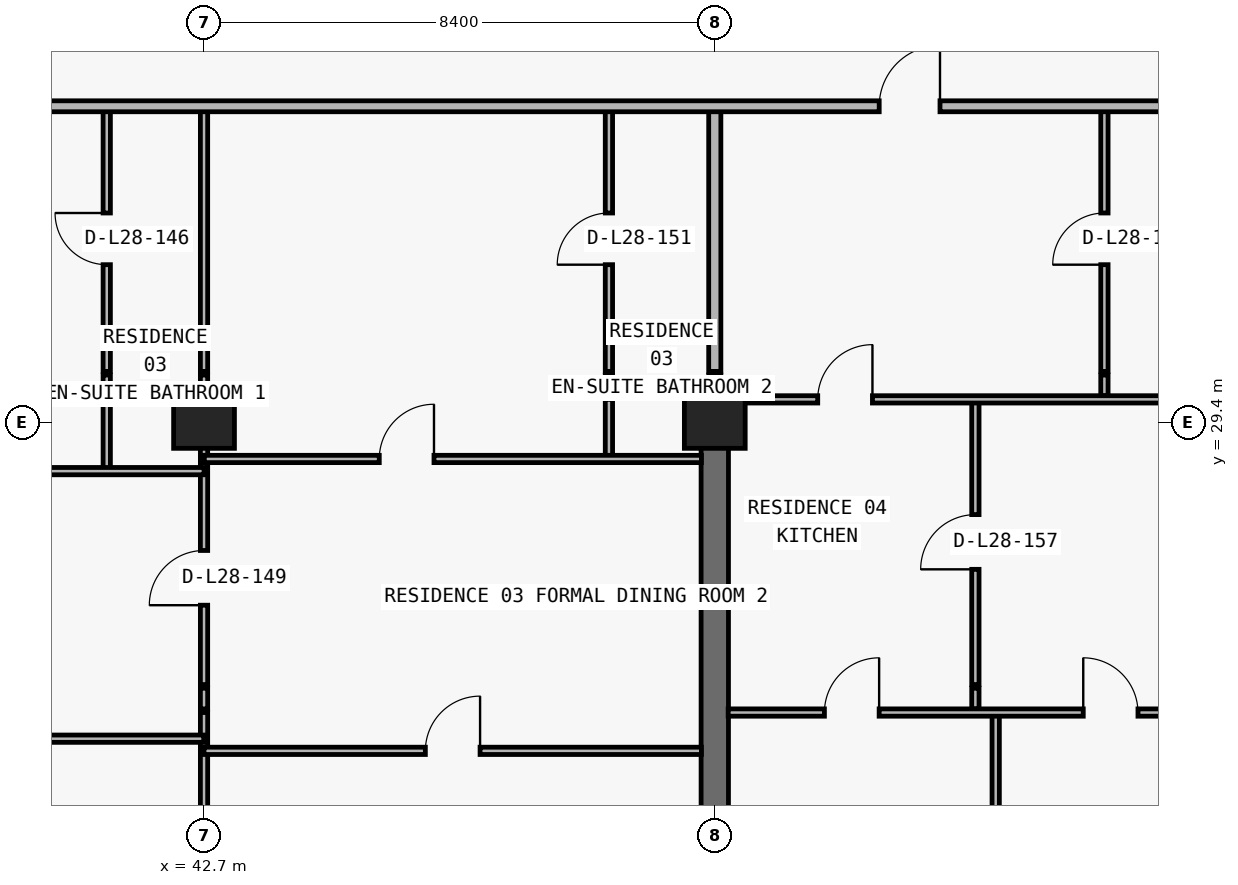
"""IFC4 building model, lengths in metres.
Left out: names, types, materials, properties, quantities, classifications, styles, units other than length and angle.
Written with IfcOpenShell. Run it as: python <this file> out.ifc"""

import sys

from ifc_helpers import new_model, si_unit, direction, frame, frame_2d, origin, origin_2d, place, context, subcontext, project, spatial, rectangle, extrude, element, fill, save


model = new_model("IFC4")
c1 = context("Model", 3, precision=1e-05, world=origin(), true_north=direction((0.0, 1.0)))
c2 = subcontext(c1, "Body", "Model", "MODEL_VIEW")
j1 = project(units=[si_unit("LENGTHUNIT", "METRE"), si_unit("PLANEANGLEUNIT", "RADIAN")], contexts=[c1])
p1 = place(None, origin())
s1 = spatial("IfcSite", under=j1, at=p1, CompositionType="ELEMENT")
p2 = place(p1, origin())
s2 = spatial("IfcBuilding", under=s1, at=p2, CompositionType="ELEMENT")
p3 = place(p2, frame((0.0, 0.0, 105.9)))
s3 = spatial("IfcBuildingStorey", under=s2, at=p3, CompositionType="ELEMENT", Elevation=105.9)
for number, where, z_axis, x_axis in (
    (1, (42.7, 29.4, 0.0), (0.0, 0.0, 1.0), (1.0, 0.0, 0.0)),
    (2, (51.1, 29.4, 0.0), (0.0, 0.0, 1.0), (1.0, 0.0, 0.0)),
):
    element("IfcColumn", number, at=place(p3, frame(where, z_axis=z_axis, x_axis=x_axis)), inside=s3, PredefinedType="COLUMN", context=c2, shape_type="SweptSolid", body=[
        extrude(rectangle(XDim=1.0, YDim=0.85, at=origin_2d()), origin(), (0.0, 0.0, 1.0), 3.05),
    ])
p4 = place(p3, frame((51.1, 20.8, 0.0), z_axis=(0.0, 0.0, 1.0), x_axis=(0.0, 1.0, 0.0)))
e3 = element("IfcWall", 3, at=p4, inside=s3, PredefinedType="SHEAR", context=c2, shape_type="SweptSolid", body=[
    extrude(rectangle(XDim=8.6, YDim=0.45, at=frame_2d((4.3, 0.0))), origin(), (0.0, 0.0, 1.0), 3.05),
])
p5 = place(p3, frame((41.1, 28.6, 0.0), z_axis=(0.0, 0.0, 1.0), x_axis=(0.0, 1.0, 0.0)))
e4 = element("IfcWall", 4, at=p5, inside=s3, PredefinedType="PARTITIONING", context=c2, shape_type="SweptSolid", body=[
    extrude(rectangle(XDim=1.18, YDim=0.12, at=frame_2d((0.59, 0.0))), origin(), (0.0, 0.0, 1.0), 3.05),
])
p6 = place(p3, frame((41.1, 29.84, 0.0), z_axis=(0.0, 0.0, 1.0), x_axis=(0.0, 1.0, 0.0)))
e5 = element("IfcWall", 5, at=p6, inside=s3, PredefinedType="PARTITIONING", context=c2, shape_type="SweptSolid", body=[
    extrude(rectangle(XDim=0.34, YDim=0.12, at=frame_2d((0.17, 0.0))), origin(), (0.0, 0.0, 1.0), 3.05),
])
p7 = place(p3, frame((41.1, 30.24, 0.0), z_axis=(0.0, 0.0, 1.0), x_axis=(0.0, 1.0, 0.0)))
e6 = element("IfcWall", 6, at=p7, inside=s3, PredefinedType="PARTITIONING", context=c2, shape_type="SweptSolid", body=[
    extrude(rectangle(XDim=4.36, YDim=0.12, at=frame_2d((2.18, 0.0))), origin(), (0.0, 0.0, 1.0), 3.05),
])
p8 = place(p7, frame((1.755, 0.0, 0.0)))
e7 = element("IfcOpeningElement", 7, at=p8, cuts=e6, PredefinedType="OPENING", context=c2, shape_type="SweptSolid", body=[
    extrude(rectangle(XDim=0.85, YDim=2.1, at=frame_2d((0.425, 1.05))), frame((0.0, 0.07, 0.0), z_axis=(0.0, -1.0, 0.0), x_axis=(1.0, 0.0, 0.0)), (0.0, 0.0, 1.0), 0.14),
])
p9 = place(p3, frame((42.7, 8.84, 0.0), z_axis=(0.0, 0.0, 1.0), x_axis=(0.0, 1.0, 0.0)))
e8 = element("IfcWall", 8, at=p9, inside=s3, PredefinedType="PARTITIONING", context=c2, shape_type="SweptSolid", body=[
    extrude(rectangle(XDim=15.79, YDim=0.12, at=frame_2d((7.895, 0.0))), origin(), (0.0, 0.0, 1.0), 2.174),
])
p10 = place(p3, frame((42.7, 24.69, 0.0), z_axis=(0.0, 0.0, 1.0), x_axis=(0.0, 1.0, 0.0)))
e9 = element("IfcWall", 9, at=p10, inside=s3, PredefinedType="PARTITIONING", context=c2, shape_type="SweptSolid", body=[
    extrude(rectangle(XDim=0.34, YDim=0.12, at=frame_2d((0.17, 0.0))), origin(), (0.0, 0.0, 1.0), 2.174),
])
p11 = place(p3, frame((42.7, 25.09, 0.0), z_axis=(0.0, 0.0, 1.0), x_axis=(0.0, 1.0, 0.0)))
e10 = element("IfcWall", 10, at=p11, inside=s3, PredefinedType="PARTITIONING", context=c2, shape_type="SweptSolid", body=[
    extrude(rectangle(XDim=4.69, YDim=0.12, at=frame_2d((2.345, 0.0))), origin(), (0.0, 0.0, 1.0), 2.174),
])
p12 = place(p11, frame((1.305, 0.0, 0.0)))
e11 = element("IfcOpeningElement", 11, at=p12, cuts=e10, PredefinedType="OPENING", context=c2, shape_type="SweptSolid", body=[
    extrude(rectangle(XDim=0.9, YDim=2.124, at=frame_2d((0.45, 1.062))), frame((0.0, 0.07, 0.0), z_axis=(0.0, -1.0, 0.0), x_axis=(1.0, 0.0, 0.0)), (0.0, 0.0, 1.0), 0.14),
])
p13 = place(p3, frame((42.7, 29.84, 0.0), z_axis=(0.0, 0.0, 1.0), x_axis=(0.0, 1.0, 0.0)))
e12 = element("IfcWall", 12, at=p13, inside=s3, PredefinedType="PARTITIONING", context=c2, shape_type="SweptSolid", body=[
    extrude(rectangle(XDim=0.34, YDim=0.12, at=frame_2d((0.17, 0.0))), origin(), (0.0, 0.0, 1.0), 2.174),
])
p14 = place(p3, frame((42.7, 30.24, 0.0), z_axis=(0.0, 0.0, 1.0), x_axis=(0.0, 1.0, 0.0)))
e13 = element("IfcWall", 13, at=p14, inside=s3, PredefinedType="PARTITIONING", context=c2, shape_type="SweptSolid", body=[
    extrude(rectangle(XDim=4.36, YDim=0.12, at=frame_2d((2.18, 0.0))), origin(), (0.0, 0.0, 1.0), 2.174),
])
p15 = place(p3, frame((49.359, 28.8, 0.0), z_axis=(0.0, 0.0, 1.0), x_axis=(0.0, 1.0, 0.0)))
e14 = element("IfcWall", 14, at=p15, inside=s3, PredefinedType="PARTITIONING", context=c2, shape_type="SweptSolid", body=[
    extrude(rectangle(XDim=0.98, YDim=0.12, at=frame_2d((0.49, 0.0))), origin(), (0.0, 0.0, 1.0), 3.05),
])
p16 = place(p3, frame((49.359, 29.84, 0.0), z_axis=(0.0, 0.0, 1.0), x_axis=(0.0, 1.0, 0.0)))
e15 = element("IfcWall", 15, at=p16, inside=s3, PredefinedType="PARTITIONING", context=c2, shape_type="SweptSolid", body=[
    extrude(rectangle(XDim=0.34, YDim=0.12, at=frame_2d((0.17, 0.0))), origin(), (0.0, 0.0, 1.0), 3.05),
])
p17 = place(p3, frame((49.359, 30.24, 0.0), z_axis=(0.0, 0.0, 1.0), x_axis=(0.0, 1.0, 0.0)))
e16 = element("IfcWall", 16, at=p17, inside=s3, PredefinedType="PARTITIONING", context=c2, shape_type="SweptSolid", body=[
    extrude(rectangle(XDim=4.36, YDim=0.12, at=frame_2d((2.18, 0.0))), origin(), (0.0, 0.0, 1.0), 3.05),
])
p18 = place(p17, frame((1.755, 0.0, 0.0)))
e17 = element("IfcOpeningElement", 17, at=p18, cuts=e16, PredefinedType="OPENING", context=c2, shape_type="SweptSolid", body=[
    extrude(rectangle(XDim=0.85, YDim=2.1, at=frame_2d((0.425, 1.05))), frame((0.0, 0.07, 0.0), z_axis=(0.0, -1.0, 0.0), x_axis=(1.0, 0.0, 0.0)), (0.0, 0.0, 1.0), 0.14),
])
p19 = place(p3, frame((51.1, 29.405, 0.0), z_axis=(0.0, 0.0, 1.0), x_axis=(0.0, 1.0, 0.0)))
e18 = element("IfcWall", 18, at=p19, inside=s3, PredefinedType="PARTITIONING", context=c2, shape_type="SweptSolid", body=[
    extrude(rectangle(XDim=0.375, YDim=0.2, at=frame_2d((0.188, 0.0))), origin(), (0.0, 0.0, 1.0), 3.05),
])
p20 = place(p3, frame((51.1, 29.84, 0.0), z_axis=(0.0, 0.0, 1.0), x_axis=(0.0, 1.0, 0.0)))
e19 = element("IfcWall", 19, at=p20, inside=s3, PredefinedType="PARTITIONING", context=c2, shape_type="SweptSolid", body=[
    extrude(rectangle(XDim=0.34, YDim=0.2, at=frame_2d((0.17, 0.0))), origin(), (0.0, 0.0, 1.0), 2.335),
])
p21 = place(p3, frame((51.1, 30.24, 0.0), z_axis=(0.0, 0.0, 1.0), x_axis=(0.0, 1.0, 0.0)))
e20 = element("IfcWall", 20, at=p21, inside=s3, PredefinedType="PARTITIONING", context=c2, shape_type="SweptSolid", body=[
    extrude(rectangle(XDim=4.36, YDim=0.2, at=frame_2d((2.18, 0.0))), origin(), (0.0, 0.0, 1.0), 2.335),
])
p22 = place(p3, frame((55.386, 24.69, 0.0), z_axis=(0.0, 0.0, 1.0), x_axis=(0.0, 1.0, 0.0)))
e21 = element("IfcWall", 21, at=p22, inside=s3, PredefinedType="PARTITIONING", context=c2, shape_type="SweptSolid", body=[
    extrude(rectangle(XDim=0.34, YDim=0.12, at=frame_2d((0.17, 0.0))), origin(), (0.0, 0.0, 1.0), 3.05),
])
p23 = place(p3, frame((55.386, 25.09, 0.0), z_axis=(0.0, 0.0, 1.0), x_axis=(0.0, 1.0, 0.0)))
e22 = element("IfcWall", 22, at=p23, inside=s3, PredefinedType="PARTITIONING", context=c2, shape_type="SweptSolid", body=[
    extrude(rectangle(XDim=4.69, YDim=0.12, at=frame_2d((2.345, 0.0))), origin(), (0.0, 0.0, 1.0), 2.725),
])
p24 = place(p23, frame((1.895, 0.0, 0.0)))
e23 = element("IfcOpeningElement", 23, at=p24, cuts=e22, PredefinedType="OPENING", context=c2, shape_type="SweptSolid", body=[
    extrude(rectangle(XDim=0.9, YDim=2.15, at=frame_2d((0.45, 1.075))), frame((0.0, 0.07, 0.0), z_axis=(0.0, -1.0, 0.0), x_axis=(1.0, 0.0, 0.0)), (0.0, 0.0, 1.0), 0.14),
])
p25 = place(p3, frame((55.72, 8.84, 0.0), z_axis=(0.0, 0.0, 1.0), x_axis=(0.0, 1.0, 0.0)))
e24 = element("IfcWall", 24, at=p25, inside=s3, PredefinedType="PARTITIONING", context=c2, shape_type="SweptSolid", body=[
    extrude(rectangle(XDim=15.79, YDim=0.12, at=frame_2d((7.895, 0.0))), origin(), (0.0, 0.0, 1.0), 3.05),
])
p26 = place(p3, frame((57.508, 29.84, 0.0), z_axis=(0.0, 0.0, 1.0), x_axis=(0.0, 1.0, 0.0)))
e25 = element("IfcWall", 25, at=p26, inside=s3, PredefinedType="PARTITIONING", context=c2, shape_type="SweptSolid", body=[
    extrude(rectangle(XDim=0.34, YDim=0.12, at=frame_2d((0.17, 0.0))), origin(), (0.0, 0.0, 1.0), 3.05),
])
p27 = place(p3, frame((57.508, 30.24, 0.0), z_axis=(0.0, 0.0, 1.0), x_axis=(0.0, 1.0, 0.0)))
e26 = element("IfcWall", 26, at=p27, inside=s3, PredefinedType="PARTITIONING", context=c2, shape_type="SweptSolid", body=[
    extrude(rectangle(XDim=4.36, YDim=0.12, at=frame_2d((2.18, 0.0))), origin(), (0.0, 0.0, 1.0), 3.05),
])
p28 = place(p27, frame((1.755, 0.0, 0.0)))
e27 = element("IfcOpeningElement", 27, at=p28, cuts=e26, PredefinedType="OPENING", context=c2, shape_type="SweptSolid", body=[
    extrude(rectangle(XDim=0.85, YDim=2.1, at=frame_2d((0.425, 1.05))), frame((0.0, 0.07, 0.0), z_axis=(0.0, -1.0, 0.0), x_axis=(1.0, 0.0, 0.0)), (0.0, 0.0, 1.0), 0.14),
])
p29 = place(p3, frame((42.7, 24.0, 0.0), z_axis=(0.0, 0.0, 1.0), x_axis=(1.0, 0.0, 0.0)))
e28 = element("IfcWall", 28, at=p29, inside=s3, PredefinedType="PARTITIONING", context=c2, shape_type="SweptSolid", body=[
    extrude(rectangle(XDim=8.18, YDim=0.12, at=frame_2d((4.09, 0.0))), origin(), (0.0, 0.0, 1.0), 3.05),
])
p30 = place(p29, frame((3.64, 0.0, 0.0)))
e29 = element("IfcOpeningElement", 29, at=p30, cuts=e28, PredefinedType="OPENING", context=c2, shape_type="SweptSolid", body=[
    extrude(rectangle(XDim=0.9, YDim=2.15, at=frame_2d((0.45, 1.075))), frame((0.0, 0.07, 0.0), z_axis=(0.0, -1.0, 0.0), x_axis=(1.0, 0.0, 0.0)), (0.0, 0.0, 1.0), 0.14),
])
p31 = place(p3, frame((35.105, 24.2, 0.0), z_axis=(0.0, 0.0, 1.0), x_axis=(1.0, 0.0, 0.0)))
e30 = element("IfcWall", 30, at=p31, inside=s3, PredefinedType="PARTITIONING", context=c2, shape_type="SweptSolid", body=[
    extrude(rectangle(XDim=7.59, YDim=0.12, at=frame_2d((3.795, 0.0))), origin(), (0.0, 0.0, 1.0), 3.05),
])
p32 = place(p31, frame((3.345, 0.0, 0.0)))
e31 = element("IfcOpeningElement", 31, at=p32, cuts=e30, PredefinedType="OPENING", context=c2, shape_type="SweptSolid", body=[
    extrude(rectangle(XDim=0.9, YDim=2.15, at=frame_2d((0.45, 1.075))), frame((0.0, 0.07, 0.0), z_axis=(0.0, -1.0, 0.0), x_axis=(1.0, 0.0, 0.0)), (0.0, 0.0, 1.0), 0.14),
])
p33 = place(p3, frame((51.32, 24.63, 0.0), z_axis=(0.0, 0.0, 1.0), x_axis=(1.0, 0.0, 0.0)))
e32 = element("IfcWall", 32, at=p33, inside=s3, PredefinedType="PARTITIONING", context=c2, shape_type="SweptSolid", body=[
    extrude(rectangle(XDim=8.18, YDim=0.12, at=frame_2d((4.09, 0.0))), origin(), (0.0, 0.0, 1.0), 3.05),
])
p34 = place(p33, frame((1.583, 0.0, 0.0)))
e33 = element("IfcOpeningElement", 33, at=p34, cuts=e32, PredefinedType="OPENING", context=c2, shape_type="SweptSolid", body=[
    extrude(rectangle(XDim=0.9, YDim=2.15, at=frame_2d((0.45, 1.075))), frame((0.0, 0.07, 0.0), z_axis=(0.0, -1.0, 0.0), x_axis=(1.0, 0.0, 0.0)), (0.0, 0.0, 1.0), 0.14),
])
p35 = place(p33, frame((5.84, 0.0, 0.0)))
e34 = element("IfcOpeningElement", 34, at=p35, cuts=e32, PredefinedType="OPENING", context=c2, shape_type="SweptSolid", body=[
    extrude(rectangle(XDim=0.9, YDim=2.15, at=frame_2d((0.45, 1.075))), frame((0.0, 0.07, 0.0), z_axis=(0.0, -1.0, 0.0), x_axis=(1.0, 0.0, 0.0)), (0.0, 0.0, 1.0), 0.14),
])
p36 = place(p3, frame((35.1, 28.6, 0.0), z_axis=(0.0, 0.0, 1.0), x_axis=(1.0, 0.0, 0.0)))
e35 = element("IfcWall", 35, at=p36, inside=s3, PredefinedType="PARTITIONING", context=c2, shape_type="SweptSolid", body=[
    extrude(rectangle(XDim=7.6, YDim=0.12, at=frame_2d((3.8, 0.0))), origin(), (0.0, 0.0, 1.0), 3.05),
])
p37 = place(p36, frame((2.55, 0.0, 0.0)))
e36 = element("IfcOpeningElement", 36, at=p37, cuts=e35, PredefinedType="OPENING", context=c2, shape_type="SweptSolid", body=[
    extrude(rectangle(XDim=0.9, YDim=2.15, at=frame_2d((0.45, 1.075))), frame((0.0, 0.07, 0.0), z_axis=(0.0, -1.0, 0.0), x_axis=(1.0, 0.0, 0.0)), (0.0, 0.0, 1.0), 0.14),
])
p38 = place(p3, frame((42.705, 28.8, 0.0), z_axis=(0.0, 0.0, 1.0), x_axis=(1.0, 0.0, 0.0)))
e37 = element("IfcWall", 37, at=p38, inside=s3, PredefinedType="PARTITIONING", context=c2, shape_type="SweptSolid", body=[
    extrude(rectangle(XDim=8.175, YDim=0.12, at=frame_2d((4.087, 0.0))), origin(), (0.0, 0.0, 1.0), 3.05),
])
p39 = place(p38, frame((2.877, 0.0, 0.0)))
e38 = element("IfcOpeningElement", 38, at=p39, cuts=e37, PredefinedType="OPENING", context=c2, shape_type="SweptSolid", body=[
    extrude(rectangle(XDim=0.9, YDim=2.15, at=frame_2d((0.45, 1.075))), frame((0.0, 0.07, 0.0), z_axis=(0.0, -1.0, 0.0), x_axis=(1.0, 0.0, 0.0)), (0.0, 0.0, 1.0), 0.14),
])
p40 = place(p3, frame((51.1, 29.78, 0.0), z_axis=(0.0, 0.0, 1.0), x_axis=(1.0, 0.0, 0.0)))
e39 = element("IfcWall", 39, at=p40, inside=s3, PredefinedType="PARTITIONING", context=c2, shape_type="SweptSolid", body=[
    extrude(rectangle(XDim=8.4, YDim=0.12, at=frame_2d((4.2, 0.0))), origin(), (0.0, 0.0, 1.0), 3.05),
])
p41 = place(p40, frame((1.693, 0.0, 0.0)))
e40 = element("IfcOpeningElement", 40, at=p41, cuts=e39, PredefinedType="OPENING", context=c2, shape_type="SweptSolid", body=[
    extrude(rectangle(XDim=0.9, YDim=2.15, at=frame_2d((0.45, 1.075))), frame((0.0, 0.07, 0.0), z_axis=(0.0, -1.0, 0.0), x_axis=(1.0, 0.0, 0.0)), (0.0, 0.0, 1.0), 0.14),
])
p42 = place(p3, frame((26.7, 34.6, 0.0), z_axis=(0.0, 0.0, 1.0), x_axis=(1.0, 0.0, 0.0)))
e41 = element("IfcWall", 41, at=p42, inside=s3, PredefinedType="PARTITIONING", context=c2, shape_type="SweptSolid", body=[
    extrude(rectangle(XDim=32.8, YDim=0.18, at=frame_2d((16.4, 0.0))), origin(), (0.0, 0.0, 1.0), 3.05),
])
p43 = place(p42, frame((2.812, 0.0, 0.0)))
e42 = element("IfcOpeningElement", 42, at=p43, cuts=e41, PredefinedType="OPENING", context=c2, shape_type="SweptSolid", body=[
    extrude(rectangle(XDim=1.0, YDim=2.2, at=frame_2d((0.5, 1.1))), frame((0.0, 0.1, 0.0), z_axis=(0.0, -1.0, 0.0), x_axis=(1.0, 0.0, 0.0)), (0.0, 0.0, 1.0), 0.2),
])
p44 = place(p42, frame((27.104, 0.0, 0.0)))
e43 = element("IfcOpeningElement", 43, at=p44, cuts=e41, PredefinedType="OPENING", context=c2, shape_type="SweptSolid", body=[
    extrude(rectangle(XDim=1.0, YDim=2.2, at=frame_2d((0.5, 1.1))), frame((0.0, 0.1, 0.0), z_axis=(0.0, -1.0, 0.0), x_axis=(1.0, 0.0, 0.0)), (0.0, 0.0, 1.0), 0.2),
])
p45 = place(p8, origin())
e44 = element("IfcDoor", 44, at=p45, inside=s3, OperationType="SINGLE_SWING_RIGHT", PredefinedType="DOOR", context=c2, shape_type="SweptSolid", body=[
    extrude(rectangle(XDim=0.85, YDim=2.1, at=frame_2d((0.425, 1.05))), frame((0.0, 0.025, 0.0), z_axis=(0.0, -1.0, 0.0), x_axis=(1.0, 0.0, 0.0)), (0.0, 0.0, 1.0), 0.05),
])
fill(e7, e44)
p46 = place(p12, origin())
e45 = element("IfcDoor", 45, at=p46, inside=s3, OperationType="SINGLE_SWING_LEFT", PredefinedType="DOOR", context=c2, shape_type="SweptSolid", body=[
    extrude(rectangle(XDim=0.9, YDim=2.124, at=frame_2d((0.45, 1.062))), frame((0.0, 0.025, 0.0), z_axis=(0.0, -1.0, 0.0), x_axis=(1.0, 0.0, 0.0)), (0.0, 0.0, 1.0), 0.05),
])
fill(e11, e45)
p47 = place(p39, origin())
e46 = element("IfcDoor", 46, at=p47, inside=s3, OperationType="SINGLE_SWING_RIGHT", PredefinedType="DOOR", context=c2, shape_type="SweptSolid", body=[
    extrude(rectangle(XDim=0.9, YDim=2.15, at=frame_2d((0.45, 1.075))), frame((0.0, 0.025, 0.0), z_axis=(0.0, -1.0, 0.0), x_axis=(1.0, 0.0, 0.0)), (0.0, 0.0, 1.0), 0.05),
])
fill(e38, e46)
p48 = place(p18, origin())
e47 = element("IfcDoor", 47, at=p48, inside=s3, OperationType="SINGLE_SWING_LEFT", PredefinedType="DOOR", context=c2, shape_type="SweptSolid", body=[
    extrude(rectangle(XDim=0.85, YDim=2.1, at=frame_2d((0.425, 1.05))), frame((0.0, 0.025, 0.0), z_axis=(0.0, -1.0, 0.0), x_axis=(1.0, 0.0, 0.0)), (0.0, 0.0, 1.0), 0.05),
])
fill(e17, e47)
p49 = place(p30, origin())
e48 = element("IfcDoor", 48, at=p49, inside=s3, OperationType="SINGLE_SWING_RIGHT", PredefinedType="DOOR", context=c2, shape_type="SweptSolid", body=[
    extrude(rectangle(XDim=0.9, YDim=2.15, at=frame_2d((0.45, 1.075))), frame((0.0, 0.025, 0.0), z_axis=(0.0, -1.0, 0.0), x_axis=(1.0, 0.0, 0.0)), (0.0, 0.0, 1.0), 0.05),
])
fill(e29, e48)
p50 = place(p44, origin())
e49 = element("IfcDoor", 49, at=p50, inside=s3, OperationType="SINGLE_SWING_RIGHT", PredefinedType="DOOR", context=c2, shape_type="SweptSolid", body=[
    extrude(rectangle(XDim=1.0, YDim=2.2, at=frame_2d((0.5, 1.1))), frame((0.0, 0.025, 0.0), z_axis=(0.0, -1.0, 0.0), x_axis=(1.0, 0.0, 0.0)), (0.0, 0.0, 1.0), 0.05),
])
fill(e43, e49)
p51 = place(p28, origin())
e50 = element("IfcDoor", 50, at=p51, inside=s3, OperationType="SINGLE_SWING_LEFT", PredefinedType="DOOR", context=c2, shape_type="SweptSolid", body=[
    extrude(rectangle(XDim=0.85, YDim=2.1, at=frame_2d((0.425, 1.05))), frame((0.0, 0.025, 0.0), z_axis=(0.0, -1.0, 0.0), x_axis=(1.0, 0.0, 0.0)), (0.0, 0.0, 1.0), 0.05),
])
fill(e27, e50)
p52 = place(p41, origin())
e51 = element("IfcDoor", 51, at=p52, inside=s3, OperationType="SINGLE_SWING_RIGHT", PredefinedType="DOOR", context=c2, shape_type="SweptSolid", body=[
    extrude(rectangle(XDim=0.9, YDim=2.15, at=frame_2d((0.45, 1.075))), frame((0.0, 0.025, 0.0), z_axis=(0.0, -1.0, 0.0), x_axis=(1.0, 0.0, 0.0)), (0.0, 0.0, 1.0), 0.05),
])
fill(e40, e51)
p53 = place(p24, origin())
e52 = element("IfcDoor", 52, at=p53, inside=s3, OperationType="SINGLE_SWING_LEFT", PredefinedType="DOOR", context=c2, shape_type="SweptSolid", body=[
    extrude(rectangle(XDim=0.9, YDim=2.15, at=frame_2d((0.45, 1.075))), frame((0.0, 0.025, 0.0), z_axis=(0.0, -1.0, 0.0), x_axis=(1.0, 0.0, 0.0)), (0.0, 0.0, 1.0), 0.05),
])
fill(e23, e52)
p54 = place(p34, origin())
e53 = element("IfcDoor", 53, at=p54, inside=s3, OperationType="SINGLE_SWING_RIGHT", PredefinedType="DOOR", context=c2, shape_type="SweptSolid", body=[
    extrude(rectangle(XDim=0.9, YDim=2.15, at=frame_2d((0.45, 1.075))), frame((0.0, 0.025, 0.0), z_axis=(0.0, -1.0, 0.0), x_axis=(1.0, 0.0, 0.0)), (0.0, 0.0, 1.0), 0.05),
])
fill(e33, e53)
p55 = place(p35, origin())
e54 = element("IfcDoor", 54, at=p55, inside=s3, OperationType="SINGLE_SWING_LEFT", PredefinedType="DOOR", context=c2, shape_type="SweptSolid", body=[
    extrude(rectangle(XDim=0.9, YDim=2.15, at=frame_2d((0.45, 1.075))), frame((0.0, 0.025, 0.0), z_axis=(0.0, -1.0, 0.0), x_axis=(1.0, 0.0, 0.0)), (0.0, 0.0, 1.0), 0.05),
])
fill(e34, e54)
save(model, sys.argv[1])
